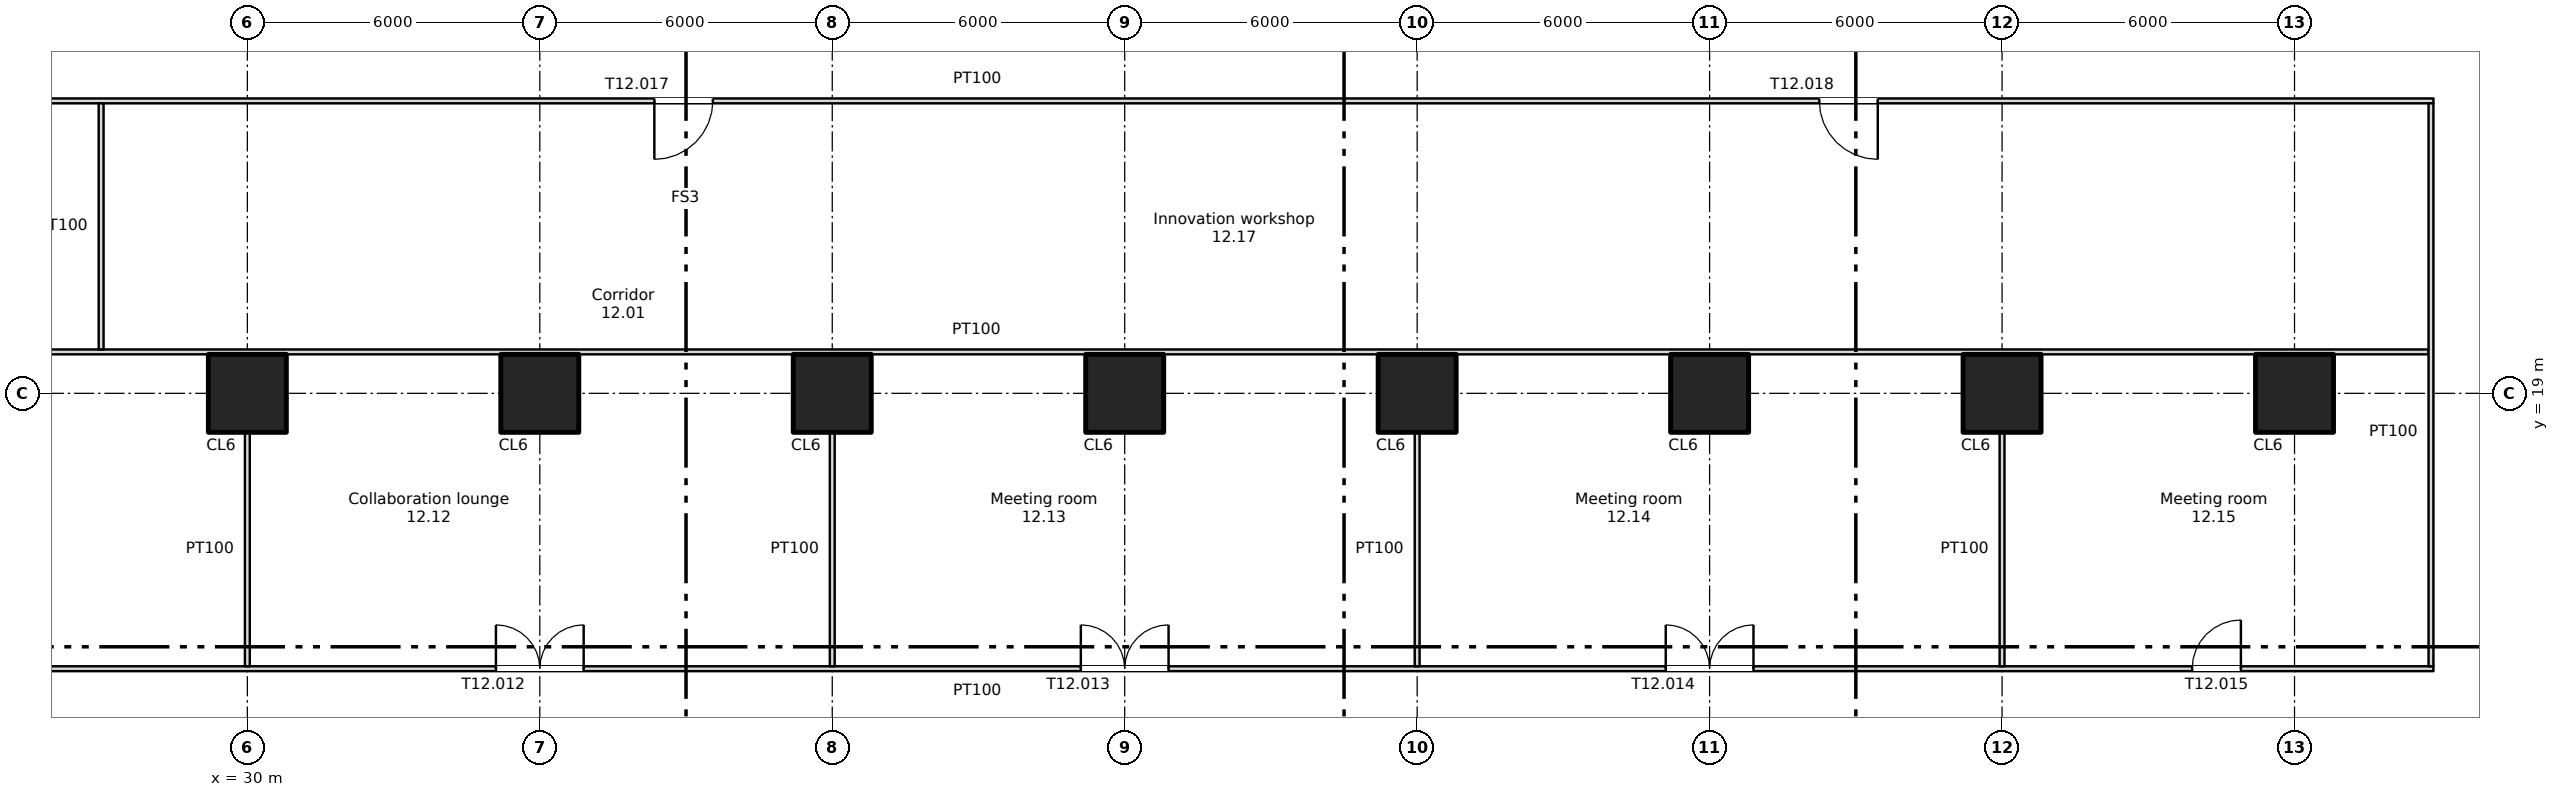
"""IFC4 building model, lengths in metres.
Left out: names, types, materials, properties, quantities, classifications, styles, units other than length and angle.
Written with IfcOpenShell. Run it as: python <this file> out.ifc"""

import sys

from ifc_helpers import new_model, si_unit, direction, frame, frame_2d, origin, origin_2d, place, context, subcontext, project, spatial, rectangle, extrude, element, fill, save


model = new_model("IFC4")
c1 = context("Model", 3, precision=1e-05, world=origin(), true_north=direction((0.0, 1.0)))
c2 = subcontext(c1, "Body", "Model", "MODEL_VIEW")
j1 = project(units=[si_unit("LENGTHUNIT", "METRE"), si_unit("PLANEANGLEUNIT", "RADIAN")], contexts=[c1])
p1 = place(None, origin())
s1 = spatial("IfcSite", under=j1, at=p1, CompositionType="ELEMENT")
p2 = place(p1, origin())
s2 = spatial("IfcBuilding", under=s1, at=p2, CompositionType="ELEMENT")
p3 = place(p2, frame((0.0, 0.0, 63.75)))
s3 = spatial("IfcBuildingStorey", under=s2, at=p3, CompositionType="ELEMENT", Elevation=63.75)
for number, where, z_axis, x_axis in (
    (1, (30.0, 19.0, 0.0), (0.0, 0.0, 1.0), (1.0, 0.0, 0.0)),
    (2, (36.0, 19.0, 0.0), (0.0, 0.0, 1.0), (1.0, 0.0, 0.0)),
    (3, (42.0, 19.0, 0.0), (0.0, 0.0, 1.0), (1.0, 0.0, 0.0)),
    (4, (48.0, 19.0, 0.0), (0.0, 0.0, 1.0), (1.0, 0.0, 0.0)),
    (5, (54.0, 19.0, 0.0), (0.0, 0.0, 1.0), (1.0, 0.0, 0.0)),
    (6, (60.0, 19.0, 0.0), (0.0, 0.0, 1.0), (1.0, 0.0, 0.0)),
    (7, (66.0, 19.0, 0.0), (0.0, 0.0, 1.0), (1.0, 0.0, 0.0)),
    (8, (72.0, 19.0, 0.0), (0.0, 0.0, 1.0), (1.0, 0.0, 0.0)),
):
    element("IfcColumn", number, at=place(p3, frame(where, z_axis=z_axis, x_axis=x_axis)), inside=s3, PredefinedType="COLUMN", context=c2, shape_type="SweptSolid", body=[
        extrude(rectangle(XDim=1.6, YDim=1.6, at=origin_2d()), origin(), (0.0, 0.0, 1.0), 3.35),
    ])
p4 = place(p3, frame((3.15, 13.35, 0.0), z_axis=(0.0, 0.0, 1.0), x_axis=(1.0, 0.0, 0.0)))
e9 = element("IfcWall", 9, at=p4, inside=s3, PredefinedType="PARTITIONING", context=c2, shape_type="SweptSolid", body=[
    extrude(rectangle(XDim=71.7, YDim=0.1, at=frame_2d((35.85, 0.0))), origin(), (0.0, 0.0, 1.0), 3.35),
])
p5 = place(p4, frame((9.85, 0.0, 0.0)))
e10 = element("IfcOpeningElement", 10, at=p5, cuts=e9, PredefinedType="OPENING", context=c2, shape_type="SweptSolid", body=[
    extrude(rectangle(XDim=1.0, YDim=2.1, at=frame_2d((0.5, 1.05))), frame((0.0, 0.06, 0.0), z_axis=(0.0, -1.0, 0.0), x_axis=(1.0, 0.0, 0.0)), (0.0, 0.0, 1.0), 0.12),
])
p6 = place(p4, frame((19.95, 0.0, 0.0)))
e11 = element("IfcOpeningElement", 11, at=p6, cuts=e9, PredefinedType="OPENING", context=c2, shape_type="SweptSolid", body=[
    extrude(rectangle(XDim=1.8, YDim=2.1, at=frame_2d((0.9, 1.05))), frame((0.0, 0.06, 0.0), z_axis=(0.0, -1.0, 0.0), x_axis=(1.0, 0.0, 0.0)), (0.0, 0.0, 1.0), 0.12),
])
p7 = place(p4, frame((31.95, 0.0, 0.0)))
e12 = element("IfcOpeningElement", 12, at=p7, cuts=e9, PredefinedType="OPENING", context=c2, shape_type="SweptSolid", body=[
    extrude(rectangle(XDim=1.8, YDim=2.1, at=frame_2d((0.9, 1.05))), frame((0.0, 0.06, 0.0), z_axis=(0.0, -1.0, 0.0), x_axis=(1.0, 0.0, 0.0)), (0.0, 0.0, 1.0), 0.12),
])
p8 = place(p4, frame((43.95, 0.0, 0.0)))
e13 = element("IfcOpeningElement", 13, at=p8, cuts=e9, PredefinedType="OPENING", context=c2, shape_type="SweptSolid", body=[
    extrude(rectangle(XDim=1.8, YDim=2.1, at=frame_2d((0.9, 1.05))), frame((0.0, 0.06, 0.0), z_axis=(0.0, -1.0, 0.0), x_axis=(1.0, 0.0, 0.0)), (0.0, 0.0, 1.0), 0.12),
])
p9 = place(p4, frame((55.95, 0.0, 0.0)))
e14 = element("IfcOpeningElement", 14, at=p9, cuts=e9, PredefinedType="OPENING", context=c2, shape_type="SweptSolid", body=[
    extrude(rectangle(XDim=1.8, YDim=2.1, at=frame_2d((0.9, 1.05))), frame((0.0, 0.06, 0.0), z_axis=(0.0, -1.0, 0.0), x_axis=(1.0, 0.0, 0.0)), (0.0, 0.0, 1.0), 0.12),
])
p10 = place(p4, frame((66.75, 0.0, 0.0)))
e15 = element("IfcOpeningElement", 15, at=p10, cuts=e9, PredefinedType="OPENING", context=c2, shape_type="SweptSolid", body=[
    extrude(rectangle(XDim=1.0, YDim=2.1, at=frame_2d((0.5, 1.05))), frame((0.0, 0.06, 0.0), z_axis=(0.0, -1.0, 0.0), x_axis=(1.0, 0.0, 0.0)), (0.0, 0.0, 1.0), 0.12),
])
p11 = place(p3, frame((3.25, 19.85, 0.0), z_axis=(0.0, 0.0, 1.0), x_axis=(1.0, 0.0, 0.0)))
e16 = element("IfcWall", 16, at=p11, inside=s3, PredefinedType="PARTITIONING", context=c2, shape_type="SweptSolid", body=[
    extrude(rectangle(XDim=71.5, YDim=0.1, at=frame_2d((35.75, 0.0))), origin(), (0.0, 0.0, 1.0), 3.35),
])
p12 = place(p3, frame((3.15, 25.0, 0.0), z_axis=(0.0, 0.0, 1.0), x_axis=(1.0, 0.0, 0.0)))
e17 = element("IfcWall", 17, at=p12, inside=s3, PredefinedType="PARTITIONING", context=c2, shape_type="SweptSolid", body=[
    extrude(rectangle(XDim=71.7, YDim=0.1, at=frame_2d((35.85, 0.0))), origin(), (0.0, 0.0, 1.0), 3.35),
])
p13 = place(p12, frame((11.05, 0.0, 0.0)))
e18 = element("IfcOpeningElement", 18, at=p13, cuts=e17, PredefinedType="OPENING", context=c2, shape_type="SweptSolid", body=[
    extrude(rectangle(XDim=1.8, YDim=2.1, at=frame_2d((0.9, 1.05))), frame((0.0, 0.06, 0.0), z_axis=(0.0, -1.0, 0.0), x_axis=(1.0, 0.0, 0.0)), (0.0, 0.0, 1.0), 0.12),
])
p14 = place(p12, frame((35.2, 0.0, 0.0)))
e19 = element("IfcOpeningElement", 19, at=p14, cuts=e17, PredefinedType="OPENING", context=c2, shape_type="SweptSolid", body=[
    extrude(rectangle(XDim=1.2, YDim=2.1, at=frame_2d((0.6, 1.05))), frame((0.0, 0.06, 0.0), z_axis=(0.0, -1.0, 0.0), x_axis=(1.0, 0.0, 0.0)), (0.0, 0.0, 1.0), 0.12),
])
p15 = place(p12, frame((59.1, 0.0, 0.0)))
e20 = element("IfcOpeningElement", 20, at=p15, cuts=e17, PredefinedType="OPENING", context=c2, shape_type="SweptSolid", body=[
    extrude(rectangle(XDim=1.2, YDim=2.1, at=frame_2d((0.6, 1.05))), frame((0.0, 0.06, 0.0), z_axis=(0.0, -1.0, 0.0), x_axis=(1.0, 0.0, 0.0)), (0.0, 0.0, 1.0), 0.12),
])
p16 = place(p3, frame((27.0, 19.9, 0.0), z_axis=(0.0, 0.0, 1.0), x_axis=(0.0, 1.0, 0.0)))
e21 = element("IfcWall", 21, at=p16, inside=s3, PredefinedType="PARTITIONING", context=c2, shape_type="SweptSolid", body=[
    extrude(rectangle(XDim=5.05, YDim=0.1, at=frame_2d((2.525, 0.0))), origin(), (0.0, 0.0, 1.0), 3.35),
])
for number, where, z_axis, x_axis in (
    (22, (30.0, 13.4, 0.0), (0.0, 0.0, 1.0), (0.0, 1.0, 0.0)),
    (23, (42.0, 13.4, 0.0), (0.0, 0.0, 1.0), (0.0, 1.0, 0.0)),
    (24, (54.0, 13.4, 0.0), (0.0, 0.0, 1.0), (0.0, 1.0, 0.0)),
    (25, (66.0, 13.4, 0.0), (0.0, 0.0, 1.0), (0.0, 1.0, 0.0)),
):
    element("IfcWall", number, at=place(p3, frame(where, z_axis=z_axis, x_axis=x_axis)), inside=s3, PredefinedType="PARTITIONING", context=c2, shape_type="SweptSolid", body=[
        extrude(rectangle(XDim=4.8, YDim=0.1, at=frame_2d((2.4, 0.0))), origin(), (0.0, 0.0, 1.0), 3.35),
    ])
p17 = place(p3, frame((74.8, 13.4, 0.0), z_axis=(0.0, 0.0, 1.0), x_axis=(0.0, 1.0, 0.0)))
e26 = element("IfcWall", 26, at=p17, inside=s3, PredefinedType="PARTITIONING", context=c2, shape_type="SweptSolid", body=[
    extrude(rectangle(XDim=11.55, YDim=0.1, at=frame_2d((5.775, 0.0))), origin(), (0.0, 0.0, 1.0), 3.35),
])
p18 = place(p7, origin())
e27 = element("IfcDoor", 27, at=p18, inside=s3, OperationType="DOUBLE_DOOR_SINGLE_SWING", PredefinedType="DOOR", context=c2, shape_type="SweptSolid", body=[
    extrude(rectangle(XDim=1.8, YDim=2.1, at=frame_2d((0.9, 1.05))), frame((0.0, 0.025, 0.0), z_axis=(0.0, -1.0, 0.0), x_axis=(1.0, 0.0, 0.0)), (0.0, 0.0, 1.0), 0.05),
])
fill(e12, e27)
p19 = place(p8, origin())
e28 = element("IfcDoor", 28, at=p19, inside=s3, OperationType="DOUBLE_DOOR_SINGLE_SWING", PredefinedType="DOOR", context=c2, shape_type="SweptSolid", body=[
    extrude(rectangle(XDim=1.8, YDim=2.1, at=frame_2d((0.9, 1.05))), frame((0.0, 0.025, 0.0), z_axis=(0.0, -1.0, 0.0), x_axis=(1.0, 0.0, 0.0)), (0.0, 0.0, 1.0), 0.05),
])
fill(e13, e28)
p20 = place(p9, origin())
e29 = element("IfcDoor", 29, at=p20, inside=s3, OperationType="DOUBLE_DOOR_SINGLE_SWING", PredefinedType="DOOR", context=c2, shape_type="SweptSolid", body=[
    extrude(rectangle(XDim=1.8, YDim=2.1, at=frame_2d((0.9, 1.05))), frame((0.0, 0.025, 0.0), z_axis=(0.0, -1.0, 0.0), x_axis=(1.0, 0.0, 0.0)), (0.0, 0.0, 1.0), 0.05),
])
fill(e14, e29)
p21 = place(p10, origin())
e30 = element("IfcDoor", 30, at=p21, inside=s3, OperationType="SINGLE_SWING_RIGHT", PredefinedType="DOOR", context=c2, shape_type="SweptSolid", body=[
    extrude(rectangle(XDim=1.0, YDim=2.1, at=frame_2d((0.5, 1.05))), frame((0.0, 0.025, 0.0), z_axis=(0.0, -1.0, 0.0), x_axis=(1.0, 0.0, 0.0)), (0.0, 0.0, 1.0), 0.05),
])
fill(e15, e30)
p22 = place(p14, origin())
e31 = element("IfcDoor", 31, at=p22, inside=s3, OperationType="SINGLE_SWING_LEFT", PredefinedType="DOOR", context=c2, shape_type="SweptSolid", body=[
    extrude(rectangle(XDim=1.2, YDim=2.1, at=frame_2d((0.6, 1.05))), frame((0.0, 0.025, 0.0), z_axis=(0.0, -1.0, 0.0), x_axis=(1.0, 0.0, 0.0)), (0.0, 0.0, 1.0), 0.05),
])
fill(e19, e31)
p23 = place(p15, origin())
e32 = element("IfcDoor", 32, at=p23, inside=s3, OperationType="SINGLE_SWING_RIGHT", PredefinedType="DOOR", context=c2, shape_type="SweptSolid", body=[
    extrude(rectangle(XDim=1.2, YDim=2.1, at=frame_2d((0.6, 1.05))), frame((0.0, 0.025, 0.0), z_axis=(0.0, -1.0, 0.0), x_axis=(1.0, 0.0, 0.0)), (0.0, 0.0, 1.0), 0.05),
])
fill(e20, e32)
save(model, sys.argv[1])
